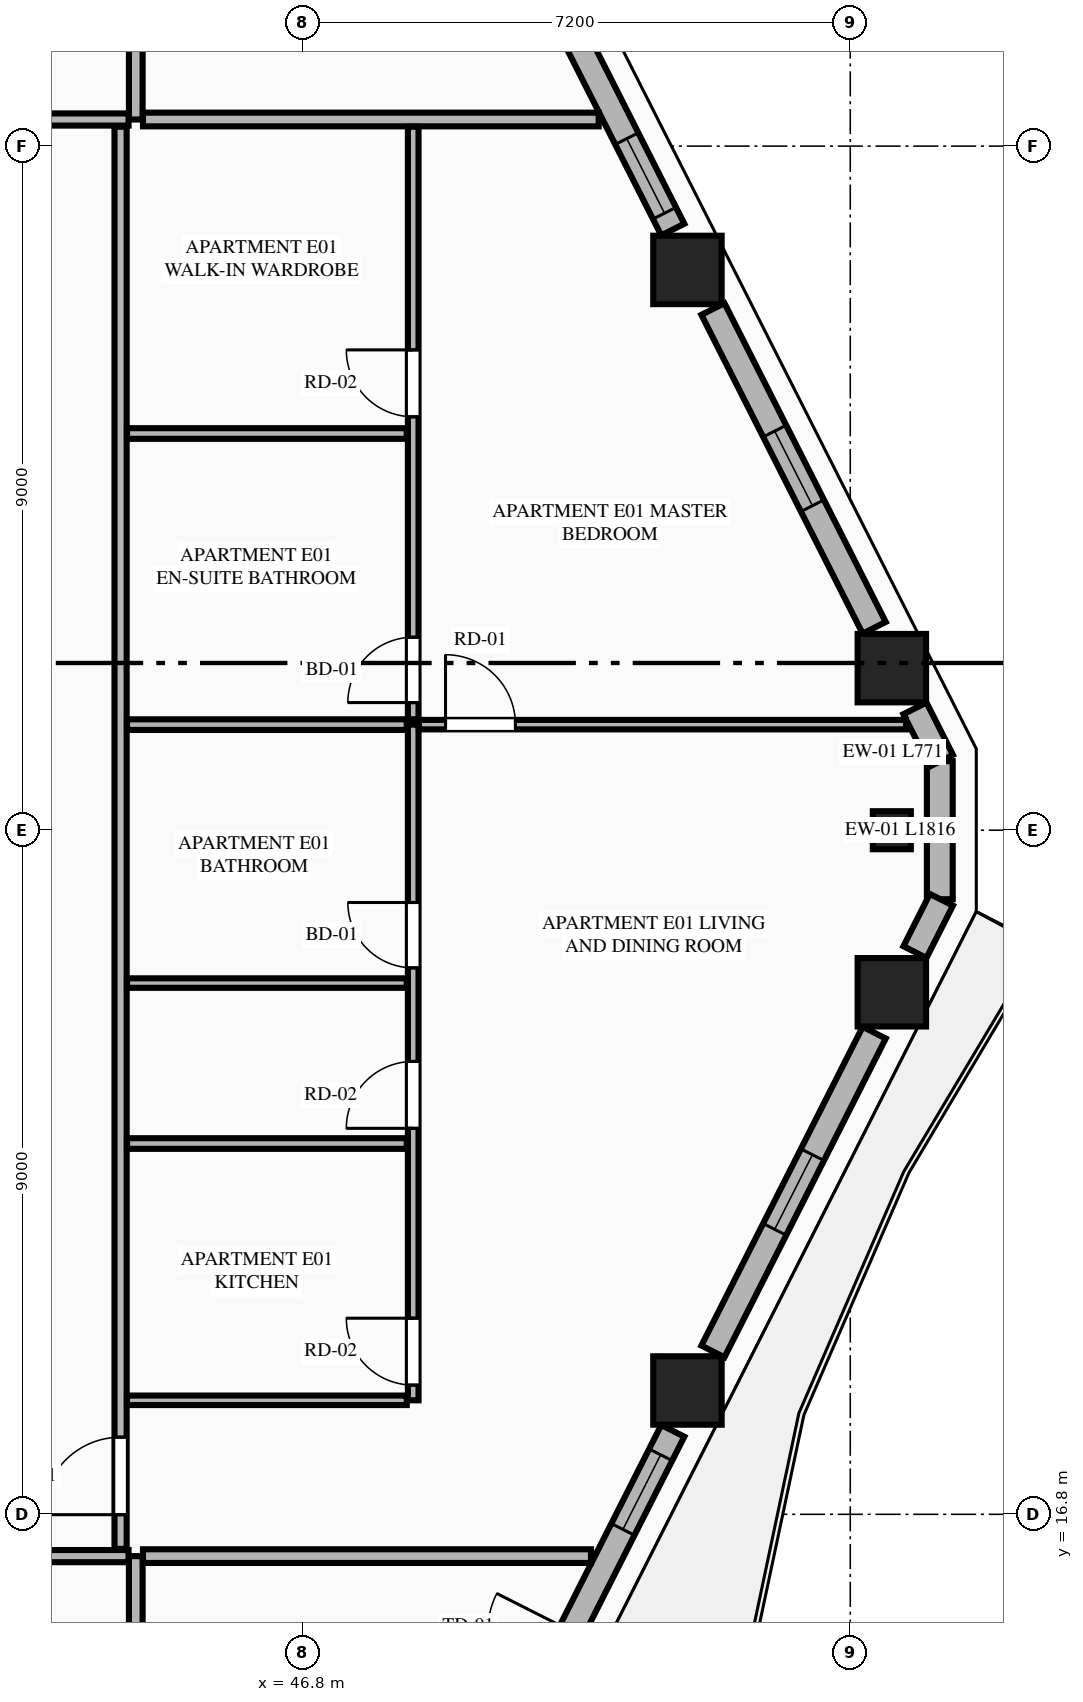
"""IFC4 building model, lengths in metres.
Left out: names, types, materials, properties, quantities, classifications, styles, units other than length and angle.
Written with IfcOpenShell. Run it as: python <this file> out.ifc"""

import sys

from ifc_helpers import new_model, si_unit, direction, frame, frame_2d, origin, origin_2d, place, context, subcontext, project, spatial, rectangle, extrude, element, fill, save


model = new_model("IFC4")
c1 = context("Model", 3, precision=1e-05, world=origin(), true_north=direction((0.0, 1.0)))
c2 = subcontext(c1, "Body", "Model", "MODEL_VIEW")
j1 = project(units=[si_unit("LENGTHUNIT", "METRE"), si_unit("PLANEANGLEUNIT", "RADIAN")], contexts=[c1])
p1 = place(None, origin())
s1 = spatial("IfcSite", under=j1, at=p1, CompositionType="ELEMENT")
p2 = place(p1, origin())
s2 = spatial("IfcBuilding", under=s1, at=p2, CompositionType="ELEMENT")
p3 = place(p2, frame((0.0, 0.0, 182.55)))
s3 = spatial("IfcBuildingStorey", under=s2, at=p3, CompositionType="ELEMENT", Elevation=182.55)
for number, where, z_axis, x_axis in (
    (1, (51.858, 18.429, 0.0), (0.0, 0.0, 1.0), (1.0, 0.0, 0.0)),
    (2, (54.547, 23.668, 0.0), (0.0, 0.0, 1.0), (1.0, 0.0, 0.0)),
    (3, (54.547, 27.932, 0.0), (0.0, 0.0, 1.0), (1.0, 0.0, 0.0)),
    (4, (51.858, 33.171, 0.0), (0.0, 0.0, 1.0), (1.0, 0.0, 0.0)),
):
    element("IfcColumn", number, at=place(p3, frame(where, z_axis=z_axis, x_axis=x_axis)), inside=s3, PredefinedType="COLUMN", context=c2, shape_type="SweptSolid", body=[
        extrude(rectangle(XDim=0.9, YDim=0.9, at=origin_2d()), origin(), (0.0, 0.0, 1.0), 3.55),
    ])
p4 = place(p3, frame((54.547, 25.8, 0.0), z_axis=(0.0, 0.0, 1.0), x_axis=(0.0, 1.0, 0.0)))
e5 = element("IfcColumn", 5, at=p4, inside=s3, PredefinedType="PILASTER", context=c2, shape_type="SweptSolid", body=[
    extrude(rectangle(XDim=0.5, YDim=0.35, at=origin_2d()), origin(), (0.0, 0.0, 1.0), 3.55),
])
p5 = place(p3, frame((55.178, 24.892, 0.0), z_axis=(0.0, 0.0, 1.0), x_axis=(0.0, 1.0, 0.0)))
e6 = element("IfcWall", 6, at=p5, inside=s3, PredefinedType="STANDARD", context=c2, shape_type="SweptSolid", body=[
    extrude(rectangle(XDim=1.816, YDim=0.34, at=frame_2d((0.908, 0.0))), origin(), (0.0, 0.0, 1.0), 3.35),
])
p6 = place(p3, frame((49.448, 13.517, 0.0), z_axis=(0.0, 0.0, 1.0), x_axis=(0.451544279509, 0.892248711763, 0.0)))
e7 = element("IfcWall", 7, at=p6, inside=s3, PredefinedType="STANDARD", context=c2, shape_type="SweptSolid", body=[
    extrude(rectangle(XDim=4.91, YDim=0.34, at=frame_2d((2.455, 0.0))), origin(), (0.0, 0.0, 1.0), 2.883),
])
p7 = place(p6, frame((0.856, 0.0, 0.0)))
e8 = element("IfcOpeningElement", 8, at=p7, cuts=e7, PredefinedType="OPENING", context=c2, shape_type="SweptSolid", body=[
    extrude(rectangle(XDim=1.1, YDim=2.25, at=frame_2d((0.55, 1.125))), frame((0.0, 0.18, 0.0), z_axis=(0.0, -1.0, 0.0), x_axis=(1.0, 0.0, 0.0)), (0.0, 0.0, 1.0), 0.36),
])
p8 = place(p6, frame((3.457, 0.0, 0.75)))
e9 = element("IfcOpeningElement", 9, at=p8, cuts=e7, PredefinedType="OPENING", context=c2, shape_type="SweptSolid", body=[
    extrude(rectangle(XDim=1.1, YDim=1.983, at=frame_2d((0.55, 0.991))), frame((0.0, 0.18, 0.0), z_axis=(0.0, -1.0, 0.0), x_axis=(1.0, 0.0, 0.0)), (0.0, 0.0, 1.0), 0.36),
])
p9 = place(p3, frame((52.193, 18.943, 0.0), z_axis=(0.0, 0.0, 1.0), x_axis=(0.451447222193, 0.892297823361, 0.0)))
e10 = element("IfcWall", 10, at=p9, inside=s3, PredefinedType="STANDARD", context=c2, shape_type="SweptSolid", body=[
    extrude(rectangle(XDim=4.7, YDim=0.34, at=frame_2d((2.35, 0.0))), origin(), (0.0, 0.0, 1.0), 2.883),
])
p10 = place(p9, frame((1.8, 0.0, 0.75)))
e11 = element("IfcOpeningElement", 11, at=p10, cuts=e10, PredefinedType="OPENING", context=c2, shape_type="SweptSolid", body=[
    extrude(rectangle(XDim=1.1, YDim=1.983, at=frame_2d((0.55, 0.991))), frame((0.0, 0.18, 0.0), z_axis=(0.0, -1.0, 0.0), x_axis=(1.0, 0.0, 0.0)), (0.0, 0.0, 1.0), 0.36),
])
for number, where, z_axis, x_axis in (
    (12, (54.851, 24.197, 0.0), (0.0, 0.0, 1.0), (0.451, 0.892, 0.0)),
    (13, (55.199, 26.715, 0.0), (0.0, 0.0, 1.0), (-0.451, 0.892, 0.0)),
):
    element("IfcWall", number, at=place(p3, frame(where, z_axis=z_axis, x_axis=x_axis)), inside=s3, PredefinedType="STANDARD", context=c2, shape_type="SweptSolid", body=[
        extrude(rectangle(XDim=0.771, YDim=0.34, at=frame_2d((0.385, 0.0))), origin(), (0.0, 0.0, 1.0), 3.35),
    ])
p11 = place(p3, frame((54.315, 28.463, 0.0), z_axis=(0.0, 0.0, 1.0), x_axis=(-0.451426298588, 0.892308409096, 0.0)))
e14 = element("IfcWall", 14, at=p11, inside=s3, PredefinedType="STANDARD", context=c2, shape_type="SweptSolid", body=[
    extrude(rectangle(XDim=4.7, YDim=0.34, at=frame_2d((2.35, 0.0))), origin(), (0.0, 0.0, 1.0), 2.883),
])
p12 = place(p11, frame((1.8, 0.0, 0.75)))
e15 = element("IfcOpeningElement", 15, at=p12, cuts=e14, PredefinedType="OPENING", context=c2, shape_type="SweptSolid", body=[
    extrude(rectangle(XDim=1.1, YDim=1.983, at=frame_2d((0.55, 0.991))), frame((0.0, 0.18, 0.0), z_axis=(0.0, -1.0, 0.0), x_axis=(1.0, 0.0, 0.0)), (0.0, 0.0, 1.0), 0.36),
])
p13 = place(p3, frame((51.665, 33.702, 0.0), z_axis=(0.0, 0.0, 1.0), x_axis=(-0.451524246964, 0.89225884944, 0.0)))
e16 = element("IfcWall", 16, at=p13, inside=s3, PredefinedType="STANDARD", context=c2, shape_type="SweptSolid", body=[
    extrude(rectangle(XDim=4.91, YDim=0.34, at=frame_2d((2.455, 0.0))), origin(), (0.0, 0.0, 1.0), 2.883),
])
p14 = place(p13, frame((0.241, 0.0, 0.75)))
e17 = element("IfcOpeningElement", 17, at=p14, cuts=e16, PredefinedType="OPENING", context=c2, shape_type="SweptSolid", body=[
    extrude(rectangle(XDim=1.1, YDim=1.983, at=frame_2d((0.55, 0.991))), frame((0.0, 0.18, 0.0), z_axis=(0.0, -1.0, 0.0), x_axis=(1.0, 0.0, 0.0)), (0.0, 0.0, 1.0), 0.36),
])
p15 = place(p13, frame((2.847, 0.0, 0.75)))
e18 = element("IfcOpeningElement", 18, at=p15, cuts=e16, PredefinedType="OPENING", context=c2, shape_type="SweptSolid", body=[
    extrude(rectangle(XDim=1.1, YDim=1.983, at=frame_2d((0.55, 0.991))), frame((0.0, 0.18, 0.0), z_axis=(0.0, -1.0, 0.0), x_axis=(1.0, 0.0, 0.0)), (0.0, 0.0, 1.0), 0.36),
])
p16 = place(p3, frame((44.6, 5.968, 0.0), z_axis=(0.0, 0.0, 1.0), x_axis=(0.0, 1.0, 0.0)))
e19 = element("IfcWall", 19, at=p16, inside=s3, PredefinedType="PARTITIONING", context=c2, shape_type="SweptSolid", body=[
    extrude(rectangle(XDim=10.282, YDim=0.18, at=frame_2d((5.141, 0.0))), origin(), (0.0, 0.0, 1.0), 3.35),
])
p17 = place(p3, frame((28.952, 16.25, 0.0), z_axis=(0.0, 0.0, 1.0), x_axis=(1.0, 0.0, 0.0)))
e20 = element("IfcWall", 20, at=p17, inside=s3, PredefinedType="PARTITIONING", context=c2, shape_type="SweptSolid", body=[
    extrude(rectangle(XDim=15.553, YDim=0.16, at=frame_2d((7.776, 0.0))), origin(), (0.0, 0.0, 1.0), 3.35),
])
p18 = place(p17, frame((0.355, 0.0, 0.0)))
e21 = element("IfcOpeningElement", 21, at=p18, cuts=e20, PredefinedType="OPENING", context=c2, shape_type="SweptSolid", body=[
    extrude(rectangle(XDim=1.02, YDim=2.25, at=frame_2d((0.51, 1.125))), frame((0.0, 0.09, 0.0), z_axis=(0.0, -1.0, 0.0), x_axis=(1.0, 0.0, 0.0)), (0.0, 0.0, 1.0), 0.18),
])
p19 = place(p3, frame((44.6, 35.15, 0.0), z_axis=(0.0, 0.0, 1.0), x_axis=(0.0, 1.0, 0.0)))
e22 = element("IfcWall", 22, at=p19, inside=s3, PredefinedType="PARTITIONING", context=c2, shape_type="SweptSolid", body=[
    extrude(rectangle(XDim=10.482, YDim=0.18, at=frame_2d((5.241, 0.0))), origin(), (0.0, 0.0, 1.0), 3.35),
])
p20 = place(p3, frame((36.038, 35.15, 0.0), z_axis=(0.0, 0.0, 1.0), x_axis=(1.0, 0.0, 0.0)))
e23 = element("IfcWall", 23, at=p20, inside=s3, PredefinedType="PARTITIONING", context=c2, shape_type="SweptSolid", body=[
    extrude(rectangle(XDim=8.467, YDim=0.16, at=frame_2d((4.233, 0.0))), origin(), (0.0, 0.0, 1.0), 3.35),
])
p21 = place(p20, frame((6.212, 0.0, 0.0)))
e24 = element("IfcOpeningElement", 24, at=p21, cuts=e23, PredefinedType="OPENING", context=c2, shape_type="SweptSolid", body=[
    extrude(rectangle(XDim=1.02, YDim=2.25, at=frame_2d((0.51, 1.125))), frame((0.0, 0.09, 0.0), z_axis=(0.0, -1.0, 0.0), x_axis=(1.0, 0.0, 0.0)), (0.0, 0.0, 1.0), 0.18),
])
p22 = place(p3, frame((44.695, 16.25, 0.0), z_axis=(0.0, 0.0, 1.0), x_axis=(1.0, 0.0, 0.0)))
e25 = element("IfcWall", 25, at=p22, inside=s3, PredefinedType="PARTITIONING", context=c2, shape_type="SweptSolid", body=[
    extrude(rectangle(XDim=5.894, YDim=0.18, at=frame_2d((2.947, 0.0))), origin(), (0.0, 0.0, 1.0), 3.35),
])
p23 = place(p3, frame((44.695, 35.15, 0.0), z_axis=(0.0, 0.0, 1.0), x_axis=(1.0, 0.0, 0.0)))
e26 = element("IfcWall", 26, at=p23, inside=s3, PredefinedType="PARTITIONING", context=c2, shape_type="SweptSolid", body=[
    extrude(rectangle(XDim=5.995, YDim=0.18, at=frame_2d((2.998, 0.0))), origin(), (0.0, 0.0, 1.0), 3.35),
])
p24 = place(p3, frame((44.4, 16.345, 0.0), z_axis=(0.0, 0.0, 1.0), x_axis=(0.0, 1.0, 0.0)))
e27 = element("IfcWall", 27, at=p24, inside=s3, PredefinedType="PARTITIONING", context=c2, shape_type="SweptSolid", body=[
    extrude(rectangle(XDim=18.71, YDim=0.16, at=frame_2d((9.355, 0.0))), origin(), (0.0, 0.0, 1.0), 3.35),
])
p25 = place(p24, frame((0.45, 0.0, 0.0)))
e28 = element("IfcOpeningElement", 28, at=p25, cuts=e27, PredefinedType="OPENING", context=c2, shape_type="SweptSolid", body=[
    extrude(rectangle(XDim=1.02, YDim=2.25, at=frame_2d((0.51, 1.125))), frame((0.0, 0.09, 0.0), z_axis=(0.0, -1.0, 0.0), x_axis=(1.0, 0.0, 0.0)), (0.0, 0.0, 1.0), 0.18),
])
p26 = place(p3, frame((44.485, 18.3, 0.0), z_axis=(0.0, 0.0, 1.0), x_axis=(1.0, 0.0, 0.0)))
e29 = element("IfcWall", 29, at=p26, inside=s3, PredefinedType="PARTITIONING", context=c2, shape_type="SweptSolid", body=[
    extrude(rectangle(XDim=3.68, YDim=0.125, at=frame_2d((1.84, 0.0))), origin(), (0.0, 0.0, 1.0), 2.807),
])
p27 = place(p3, frame((48.25, 18.3, 0.0), z_axis=(0.0, 0.0, 1.0), x_axis=(0.0, 1.0, 0.0)))
e30 = element("IfcWall", 30, at=p27, inside=s3, PredefinedType="PLUMBINGWALL", context=c2, shape_type="SweptSolid", body=[
    extrude(rectangle(XDim=8.889, YDim=0.14, at=frame_2d((4.444, 0.0))), origin(), (0.0, 0.0, 1.0), 3.35),
])
p28 = place(p27, frame((0.2, 0.0, 0.0)))
e31 = element("IfcOpeningElement", 31, at=p28, cuts=e30, PredefinedType="OPENING", context=c2, shape_type="SweptSolid", body=[
    extrude(rectangle(XDim=0.88, YDim=2.15, at=frame_2d((0.44, 1.075))), frame((0.0, 0.08, 0.0), z_axis=(0.0, -1.0, 0.0), x_axis=(1.0, 0.0, 0.0)), (0.0, 0.0, 1.0), 0.16),
])
p29 = place(p27, frame((3.578, 0.0, 0.0)))
e32 = element("IfcOpeningElement", 32, at=p29, cuts=e30, PredefinedType="OPENING", context=c2, shape_type="SweptSolid", body=[
    extrude(rectangle(XDim=0.88, YDim=2.15, at=frame_2d((0.44, 1.075))), frame((0.0, 0.08, 0.0), z_axis=(0.0, -1.0, 0.0), x_axis=(1.0, 0.0, 0.0)), (0.0, 0.0, 1.0), 0.16),
])
p30 = place(p27, frame((5.689, 0.0, 0.0)))
e33 = element("IfcOpeningElement", 33, at=p30, cuts=e30, PredefinedType="OPENING", context=c2, shape_type="SweptSolid", body=[
    extrude(rectangle(XDim=0.86, YDim=2.1, at=frame_2d((0.43, 1.05))), frame((0.0, 0.08, 0.0), z_axis=(0.0, -1.0, 0.0), x_axis=(1.0, 0.0, 0.0)), (0.0, 0.0, 1.0), 0.16),
])
p31 = place(p3, frame((48.25, 27.259, 0.0), z_axis=(0.0, 0.0, 1.0), x_axis=(0.0, 1.0, 0.0)))
e34 = element("IfcWall", 34, at=p31, inside=s3, PredefinedType="PLUMBINGWALL", context=c2, shape_type="SweptSolid", body=[
    extrude(rectangle(XDim=7.796, YDim=0.14, at=frame_2d((3.898, 0.0))), origin(), (0.0, 0.0, 1.0), 3.35),
])
p32 = place(p31, frame((0.22, 0.0, 0.0)))
e35 = element("IfcOpeningElement", 35, at=p32, cuts=e34, PredefinedType="OPENING", context=c2, shape_type="SweptSolid", body=[
    extrude(rectangle(XDim=0.86, YDim=2.1, at=frame_2d((0.43, 1.05))), frame((0.0, 0.08, 0.0), z_axis=(0.0, -1.0, 0.0), x_axis=(1.0, 0.0, 0.0)), (0.0, 0.0, 1.0), 0.16),
])
p33 = place(p31, frame((3.98, 0.0, 0.0)))
e36 = element("IfcOpeningElement", 36, at=p33, cuts=e34, PredefinedType="OPENING", context=c2, shape_type="SweptSolid", body=[
    extrude(rectangle(XDim=0.88, YDim=2.15, at=frame_2d((0.44, 1.075))), frame((0.0, 0.08, 0.0), z_axis=(0.0, -1.0, 0.0), x_axis=(1.0, 0.0, 0.0)), (0.0, 0.0, 1.0), 0.16),
])
p34 = place(p3, frame((44.485, 27.189, 0.0), z_axis=(0.0, 0.0, 1.0), x_axis=(1.0, 0.0, 0.0)))
e37 = element("IfcWall", 37, at=p34, inside=s3, PredefinedType="PLUMBINGWALL", context=c2, shape_type="SweptSolid", body=[
    extrude(rectangle(XDim=3.68, YDim=0.14, at=frame_2d((1.84, 0.0))), origin(), (0.0, 0.0, 1.0), 3.35),
])
p35 = place(p3, frame((48.325, 27.189, 0.0), z_axis=(0.0, 0.0, 1.0), x_axis=(1.0, 0.0, 0.0)))
e38 = element("IfcWall", 38, at=p35, inside=s3, PredefinedType="PARTITIONING", context=c2, shape_type="SweptSolid", body=[
    extrude(rectangle(XDim=6.408, YDim=0.125, at=frame_2d((3.204, 0.0))), origin(), (0.0, 0.0, 1.0), 3.35),
])
p36 = place(p35, frame((0.35, 0.0, 0.0)))
e39 = element("IfcOpeningElement", 39, at=p36, cuts=e38, PredefinedType="OPENING", context=c2, shape_type="SweptSolid", body=[
    extrude(rectangle(XDim=0.92, YDim=2.15, at=frame_2d((0.46, 1.075))), frame((0.0, 0.073, 0.0), z_axis=(0.0, -1.0, 0.0), x_axis=(1.0, 0.0, 0.0)), (0.0, 0.0, 1.0), 0.145),
])
p37 = place(p3, frame((44.485, 21.678, 0.0), z_axis=(0.0, 0.0, 1.0), x_axis=(1.0, 0.0, 0.0)))
e40 = element("IfcWall", 40, at=p37, inside=s3, PredefinedType="PLUMBINGWALL", context=c2, shape_type="SweptSolid", body=[
    extrude(rectangle(XDim=3.68, YDim=0.14, at=frame_2d((1.84, 0.0))), origin(), (0.0, 0.0, 1.0), 3.35),
])
p38 = place(p3, frame((44.485, 23.789, 0.0), z_axis=(0.0, 0.0, 1.0), x_axis=(1.0, 0.0, 0.0)))
e41 = element("IfcWall", 41, at=p38, inside=s3, PredefinedType="PARTITIONING", context=c2, shape_type="SweptSolid", body=[
    extrude(rectangle(XDim=3.68, YDim=0.125, at=frame_2d((1.84, 0.0))), origin(), (0.0, 0.0, 1.0), 2.807),
])
p39 = place(p3, frame((44.485, 31.019, 0.0), z_axis=(0.0, 0.0, 1.0), x_axis=(1.0, 0.0, 0.0)))
e42 = element("IfcWall", 42, at=p39, inside=s3, PredefinedType="PLUMBINGWALL", context=c2, shape_type="SweptSolid", body=[
    extrude(rectangle(XDim=3.68, YDim=0.14, at=frame_2d((1.84, 0.0))), origin(), (0.0, 0.0, 1.0), 3.35),
])
p40 = place(p10, origin())
e43 = element("IfcWindow", 43, at=p40, inside=s3, PartitioningType="SINGLE_PANEL", PredefinedType="WINDOW", context=c2, shape_type="SweptSolid", body=[
    extrude(rectangle(XDim=1.1, YDim=1.983, at=frame_2d((0.55, 0.991))), frame((0.0, 0.03, 0.0), z_axis=(0.0, -1.0, 0.0), x_axis=(1.0, 0.0, 0.0)), (0.0, 0.0, 1.0), 0.06),
])
fill(e11, e43)
p41 = place(p12, origin())
e44 = element("IfcWindow", 44, at=p41, inside=s3, PartitioningType="SINGLE_PANEL", PredefinedType="WINDOW", context=c2, shape_type="SweptSolid", body=[
    extrude(rectangle(XDim=1.1, YDim=1.983, at=frame_2d((0.55, 0.991))), frame((0.0, 0.03, 0.0), z_axis=(0.0, -1.0, 0.0), x_axis=(1.0, 0.0, 0.0)), (0.0, 0.0, 1.0), 0.06),
])
fill(e15, e44)
p42 = place(p14, origin())
e45 = element("IfcWindow", 45, at=p42, inside=s3, PartitioningType="SINGLE_PANEL", PredefinedType="WINDOW", context=c2, shape_type="SweptSolid", body=[
    extrude(rectangle(XDim=1.1, YDim=1.983, at=frame_2d((0.55, 0.991))), frame((0.0, 0.03, 0.0), z_axis=(0.0, -1.0, 0.0), x_axis=(1.0, 0.0, 0.0)), (0.0, 0.0, 1.0), 0.06),
])
fill(e17, e45)
p43 = place(p28, origin())
e46 = element("IfcDoor", 46, at=p43, inside=s3, OperationType="SINGLE_SWING_RIGHT", PredefinedType="DOOR", context=c2, shape_type="SweptSolid", body=[
    extrude(rectangle(XDim=0.88, YDim=2.15, at=frame_2d((0.44, 1.075))), frame((0.0, 0.025, 0.0), z_axis=(0.0, -1.0, 0.0), x_axis=(1.0, 0.0, 0.0)), (0.0, 0.0, 1.0), 0.05),
])
fill(e31, e46)
p44 = place(p29, origin())
e47 = element("IfcDoor", 47, at=p44, inside=s3, OperationType="SINGLE_SWING_LEFT", PredefinedType="DOOR", context=c2, shape_type="SweptSolid", body=[
    extrude(rectangle(XDim=0.88, YDim=2.15, at=frame_2d((0.44, 1.075))), frame((0.0, 0.025, 0.0), z_axis=(0.0, -1.0, 0.0), x_axis=(1.0, 0.0, 0.0)), (0.0, 0.0, 1.0), 0.05),
])
fill(e32, e47)
p45 = place(p30, origin())
e48 = element("IfcDoor", 48, at=p45, inside=s3, OperationType="SINGLE_SWING_RIGHT", PredefinedType="DOOR", context=c2, shape_type="SweptSolid", body=[
    extrude(rectangle(XDim=0.86, YDim=2.1, at=frame_2d((0.43, 1.05))), frame((0.0, 0.025, 0.0), z_axis=(0.0, -1.0, 0.0), x_axis=(1.0, 0.0, 0.0)), (0.0, 0.0, 1.0), 0.05),
])
fill(e33, e48)
p46 = place(p32, origin())
e49 = element("IfcDoor", 49, at=p46, inside=s3, OperationType="SINGLE_SWING_LEFT", PredefinedType="DOOR", context=c2, shape_type="SweptSolid", body=[
    extrude(rectangle(XDim=0.86, YDim=2.1, at=frame_2d((0.43, 1.05))), frame((0.0, 0.025, 0.0), z_axis=(0.0, -1.0, 0.0), x_axis=(1.0, 0.0, 0.0)), (0.0, 0.0, 1.0), 0.05),
])
fill(e35, e49)
p47 = place(p33, origin())
e50 = element("IfcDoor", 50, at=p47, inside=s3, OperationType="SINGLE_SWING_RIGHT", PredefinedType="DOOR", context=c2, shape_type="SweptSolid", body=[
    extrude(rectangle(XDim=0.88, YDim=2.15, at=frame_2d((0.44, 1.075))), frame((0.0, 0.025, 0.0), z_axis=(0.0, -1.0, 0.0), x_axis=(1.0, 0.0, 0.0)), (0.0, 0.0, 1.0), 0.05),
])
fill(e36, e50)
p48 = place(p25, origin())
e51 = element("IfcDoor", 51, at=p48, inside=s3, OperationType="SINGLE_SWING_LEFT", PredefinedType="DOOR", context=c2, shape_type="SweptSolid", body=[
    extrude(rectangle(XDim=1.02, YDim=2.25, at=frame_2d((0.51, 1.125))), frame((0.0, 0.025, 0.0), z_axis=(0.0, -1.0, 0.0), x_axis=(1.0, 0.0, 0.0)), (0.0, 0.0, 1.0), 0.05),
])
fill(e28, e51)
p49 = place(p36, origin())
e52 = element("IfcDoor", 52, at=p49, inside=s3, OperationType="SINGLE_SWING_LEFT", PredefinedType="DOOR", context=c2, shape_type="SweptSolid", body=[
    extrude(rectangle(XDim=0.92, YDim=2.15, at=frame_2d((0.46, 1.075))), frame((0.0, 0.025, 0.0), z_axis=(0.0, -1.0, 0.0), x_axis=(1.0, 0.0, 0.0)), (0.0, 0.0, 1.0), 0.05),
])
fill(e39, e52)
p50 = place(p8, origin())
e53 = element("IfcWindow", 53, at=p50, inside=s3, PartitioningType="SINGLE_PANEL", PredefinedType="WINDOW", context=c2, shape_type="SweptSolid", body=[
    extrude(rectangle(XDim=1.1, YDim=1.983, at=frame_2d((0.55, 0.991))), frame((0.0, 0.03, 0.0), z_axis=(0.0, -1.0, 0.0), x_axis=(1.0, 0.0, 0.0)), (0.0, 0.0, 1.0), 0.06),
])
fill(e9, e53)
save(model, sys.argv[1])
